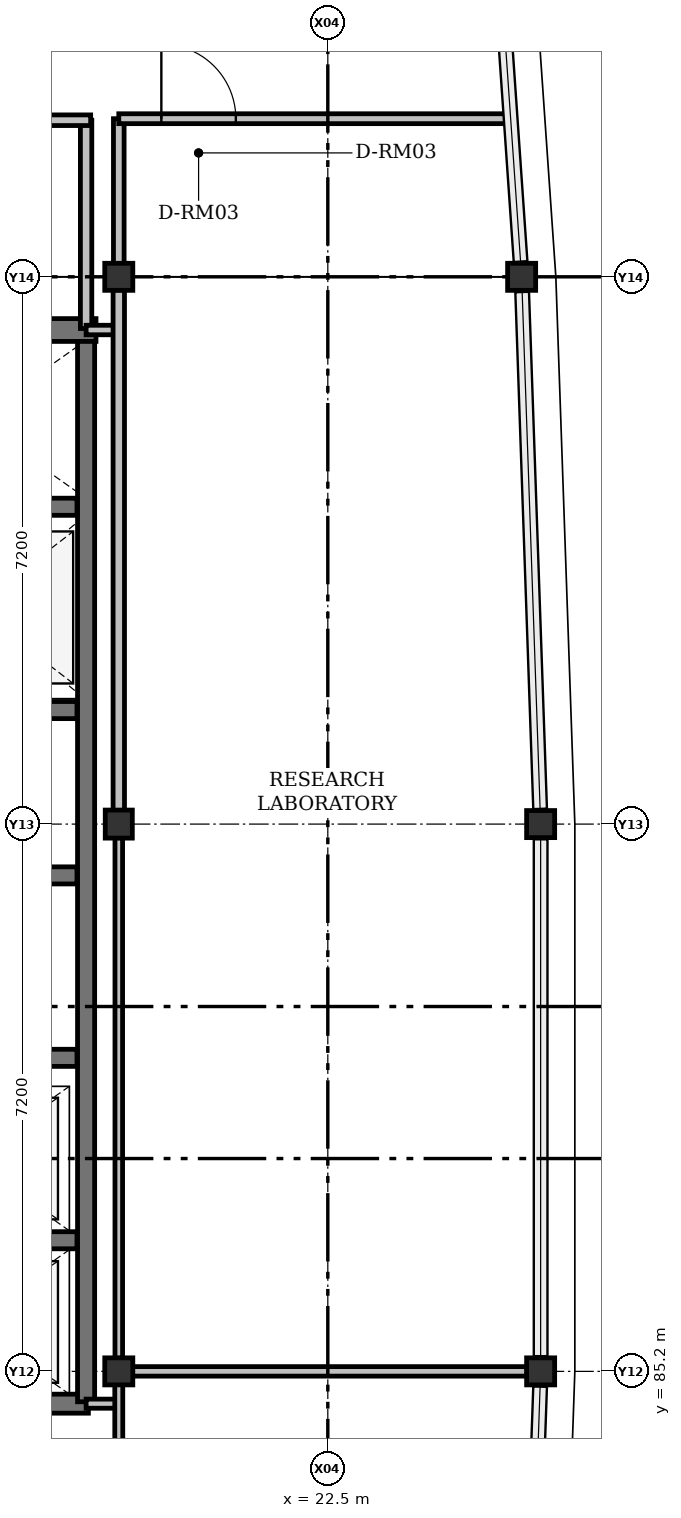
"""IFC4 building model, lengths in metres.
Left out: names, types, materials, properties, quantities, classifications, styles, units other than length and angle.
Written with IfcOpenShell. Run it as: python <this file> out.ifc"""

import sys

from ifc_helpers import new_model, si_unit, direction, frame, frame_2d, origin, origin_2d, place, context, subcontext, project, spatial, rectangle, i_section, extrude, element, fill, save


model = new_model("IFC4")
c1 = context("Model", 3, precision=1e-05, world=origin(), true_north=direction((0.0, 1.0)))
c2 = subcontext(c1, "Body", "Model", "MODEL_VIEW")
j1 = project(units=[si_unit("LENGTHUNIT", "METRE"), si_unit("PLANEANGLEUNIT", "RADIAN")], contexts=[c1])
p1 = place(None, origin())
s1 = spatial("IfcSite", under=j1, at=p1, CompositionType="ELEMENT")
p2 = place(p1, origin())
s2 = spatial("IfcBuilding", under=s1, at=p2, CompositionType="ELEMENT")
p3 = place(p2, frame((0.0, 0.0, 56.1)))
s3 = spatial("IfcBuildingStorey", under=s2, at=p3, CompositionType="ELEMENT", Elevation=56.1)
for number, where, z_axis, x_axis in (
    (1, (19.75, 85.2, 0.0), (0.0, 0.0, 1.0), (1.0, 0.0, 0.0)),
    (2, (25.3, 85.2, 0.0), (0.0, 0.0, 1.0), (1.0, 0.0, 0.0)),
    (3, (19.75, 92.4, 0.0), (0.0, 0.0, 1.0), (0.0, 1.0, 0.0)),
    (4, (25.3, 92.4, 0.0), (0.0, 0.0, 1.0), (1.0, 0.0, 0.0)),
    (5, (19.75, 99.6, 0.0), (0.0, 0.0, 1.0), (1.0, 0.0, 0.0)),
    (6, (25.05, 99.6, 0.0), (0.0, 0.0, 1.0), (1.0, 0.0, 0.0)),
):
    element("IfcColumn", number, at=place(p3, frame(where, z_axis=z_axis, x_axis=x_axis)), inside=s3, PredefinedType="COLUMN", context=c2, shape_type="SweptSolid", body=[
        extrude(i_section(OverallWidth=0.369, OverallDepth=0.356, WebThickness=0.011, FlangeThickness=0.018, FilletRadius=0.015, at=origin_2d()), origin(), (0.0, 0.0, 1.0), 4.2),
    ])
p4 = place(p3, frame((16.15, 98.9, 0.0), z_axis=(0.0, 0.0, 1.0), x_axis=(1.0, 0.0, 0.0)))
e7 = element("IfcWall", 7, at=p4, inside=s3, PredefinedType="SHEAR", context=c2, shape_type="SweptSolid", body=[
    extrude(rectangle(XDim=3.3, YDim=0.3, at=frame_2d((1.65, 0.0))), origin(), (0.0, 0.0, 1.0), 4.2),
])
p5 = place(p3, frame((16.4, 84.775, 0.0), z_axis=(0.0, 0.0, 1.0), x_axis=(1.0, 0.0, 0.0)))
e8 = element("IfcWall", 8, at=p5, inside=s3, PredefinedType="SHEAR", context=c2, shape_type="SweptSolid", body=[
    extrude(rectangle(XDim=2.95, YDim=0.25, at=frame_2d((1.475, 0.0))), origin(), (0.0, 0.0, 1.0), 4.2),
])
p6 = place(p3, frame((19.32, 84.8, 0.0), z_axis=(0.0, 0.0, 1.0), x_axis=(0.0, 1.0, 0.0)))
e9 = element("IfcWall", 9, at=p6, inside=s3, PredefinedType="SHEAR", context=c2, shape_type="SweptSolid", body=[
    extrude(rectangle(XDim=13.95, YDim=0.225, at=frame_2d((6.975, 0.0))), origin(), (0.0, 0.0, 1.0), 4.2),
])
for number, where, z_axis, x_axis in (
    (10, (16.4, 86.925, 0.0), (0.0, 0.0, 1.0), (1.0, 0.0, 0.0)),
    (11, (16.4, 89.325, 0.0), (0.0, 0.0, 1.0), (1.0, 0.0, 0.0)),
    (12, (16.4, 91.725, 0.0), (0.0, 0.0, 1.0), (1.0, 0.0, 0.0)),
    (13, (16.4, 93.9, 0.0), (0.0, 0.0, 1.0), (1.0, 0.0, 0.0)),
    (14, (16.4, 96.575, 0.0), (0.0, 0.0, 1.0), (1.0, 0.0, 0.0)),
):
    element("IfcWall", number, at=place(p3, frame(where, z_axis=z_axis, x_axis=x_axis)), inside=s3, PredefinedType="SHEAR", context=c2, shape_type="SweptSolid", body=[
        extrude(rectangle(XDim=2.8, YDim=0.225, at=frame_2d((1.4, 0.0))), origin(), (0.0, 0.0, 1.0), 4.2),
    ])
p7 = place(p3, frame((19.32, 98.92, 0.0), z_axis=(0.0, 0.0, 1.0), x_axis=(0.0, 1.0, 0.0)))
e15 = element("IfcWall", 15, at=p7, inside=s3, PredefinedType="PARTITIONING", context=c2, shape_type="SweptSolid", body=[
    extrude(rectangle(XDim=2.74, YDim=0.15, at=frame_2d((1.37, 0.0))), origin(), (0.0, 0.0, 1.0), 3.436),
])
p8 = place(p3, frame((19.38, 101.66, 0.0), z_axis=(0.0, 0.0, 1.0), x_axis=(-1.0, 0.0, 0.0)))
e16 = element("IfcWall", 16, at=p8, inside=s3, PredefinedType="PARTITIONING", context=c2, shape_type="SweptSolid", body=[
    extrude(rectangle(XDim=3.16, YDim=0.14, at=frame_2d((1.58, 0.0))), origin(), (0.0, 0.0, 1.0), 3.95),
])
p9 = place(p3, frame((19.75, 98.9, 0.0), z_axis=(0.0, 0.0, 1.0), x_axis=(-1.0, 0.0, 0.0)))
e17 = element("IfcWall", 17, at=p9, inside=s3, PredefinedType="PARTITIONING", context=c2, shape_type="SweptSolid", body=[
    extrude(rectangle(XDim=0.43, YDim=0.125, at=frame_2d((0.215, 0.0))), origin(), (0.0, 0.0, 1.0), 3.512),
])
p10 = place(p3, frame((19.32, 84.775, 0.0), z_axis=(0.0, 0.0, 1.0), x_axis=(1.0, 0.0, 0.0)))
e18 = element("IfcWall", 18, at=p10, inside=s3, PredefinedType="PARTITIONING", context=c2, shape_type="SweptSolid", body=[
    extrude(rectangle(XDim=0.43, YDim=0.12, at=frame_2d((0.215, 0.0))), origin(), (0.0, 0.0, 1.0), 3.512),
])
p11 = place(p3, frame((19.75, 78.179, 0.0), z_axis=(0.0, 0.0, 1.0), x_axis=(0.0, 1.0, 0.0)))
e19 = element("IfcWall", 19, at=p11, inside=s3, PredefinedType="PARTITIONING", context=c2, shape_type="SweptSolid", body=[
    extrude(rectangle(XDim=6.848, YDim=0.105, at=frame_2d((3.424, 0.0))), origin(), (0.0, 0.0, 1.0), 3.512),
])
p12 = place(p11, frame((2.946, 0.0, 0.0)))
e20 = element("IfcOpeningElement", 20, at=p12, cuts=e19, PredefinedType="OPENING", context=c2, shape_type="SweptSolid", body=[
    extrude(rectangle(XDim=0.95, YDim=2.1, at=frame_2d((0.475, 1.05))), frame((0.0, 0.052, 0.0), z_axis=(0.0, -1.0, 0.0), x_axis=(1.0, 0.0, 0.0)), (0.0, 0.0, 1.0), 0.105),
])
p13 = place(p3, frame((19.75, 85.373, 0.0), z_axis=(0.0, 0.0, 1.0), x_axis=(0.0, 1.0, 0.0)))
e21 = element("IfcWall", 21, at=p13, inside=s3, PredefinedType="PARTITIONING", context=c2, shape_type="SweptSolid", body=[
    extrude(rectangle(XDim=6.847, YDim=0.1, at=frame_2d((3.424, 0.0))), origin(), (0.0, 0.0, 1.0), 3.512),
])
p14 = place(p3, frame((19.75, 92.58, 0.0), z_axis=(0.0, 0.0, 1.0), x_axis=(0.0, 1.0, 0.0)))
e22 = element("IfcWall", 22, at=p14, inside=s3, PredefinedType="PARTITIONING", context=c2, shape_type="SweptSolid", body=[
    extrude(rectangle(XDim=6.847, YDim=0.15, at=frame_2d((3.424, 0.0))), origin(), (0.0, 0.0, 1.0), 3.512),
])
p15 = place(p3, frame((19.75, 99.773, 0.0), z_axis=(0.0, 0.0, 1.0), x_axis=(0.0, 1.0, 0.0)))
e23 = element("IfcWall", 23, at=p15, inside=s3, PredefinedType="PARTITIONING", context=c2, shape_type="SweptSolid", body=[
    extrude(rectangle(XDim=1.907, YDim=0.14, at=frame_2d((0.954, 0.0))), origin(), (0.0, 0.0, 1.0), 3.512),
])
p16 = place(p3, frame((19.75, 101.68, 0.0), z_axis=(0.0, 0.0, 1.0), x_axis=(1.0, 0.0, 0.0)))
e24 = element("IfcWall", 24, at=p16, inside=s3, PredefinedType="PARTITIONING", context=c2, shape_type="SweptSolid", body=[
    extrude(rectangle(XDim=5.165, YDim=0.13, at=frame_2d((2.583, 0.0))), origin(), (0.0, 0.0, 1.0), 3.512),
])
p17 = place(p16, frame((0.56, 0.0, 0.0)))
e25 = element("IfcOpeningElement", 25, at=p17, cuts=e24, PredefinedType="OPENING", context=c2, shape_type="SweptSolid", body=[
    extrude(rectangle(XDim=0.98, YDim=2.1, at=frame_2d((0.49, 1.05))), frame((0.0, 0.065, 0.0), z_axis=(0.0, -1.0, 0.0), x_axis=(1.0, 0.0, 0.0)), (0.0, 0.0, 1.0), 0.13),
])
p18 = place(p3, frame((25.121, 85.2, 0.0), z_axis=(0.0, 0.0, 1.0), x_axis=(-1.0, 0.0, 0.0)))
e26 = element("IfcWall", 26, at=p18, inside=s3, PredefinedType="PARTITIONING", context=c2, shape_type="SweptSolid", body=[
    extrude(rectangle(XDim=5.191, YDim=0.125, at=frame_2d((2.596, 0.0))), origin(), (0.0, 0.0, 1.0), 2.775),
])
p19 = place(p17, origin())
e27 = element("IfcDoor", 27, at=p19, inside=s3, OperationType="SINGLE_SWING_LEFT", PredefinedType="DOOR", context=c2, shape_type="SweptSolid", body=[
    extrude(rectangle(XDim=0.98, YDim=2.1, at=frame_2d((0.49, 1.05))), frame((0.0, 0.025, 0.0), z_axis=(0.0, -1.0, 0.0), x_axis=(1.0, 0.0, 0.0)), (0.0, 0.0, 1.0), 0.05),
])
fill(e25, e27)
save(model, sys.argv[1])
